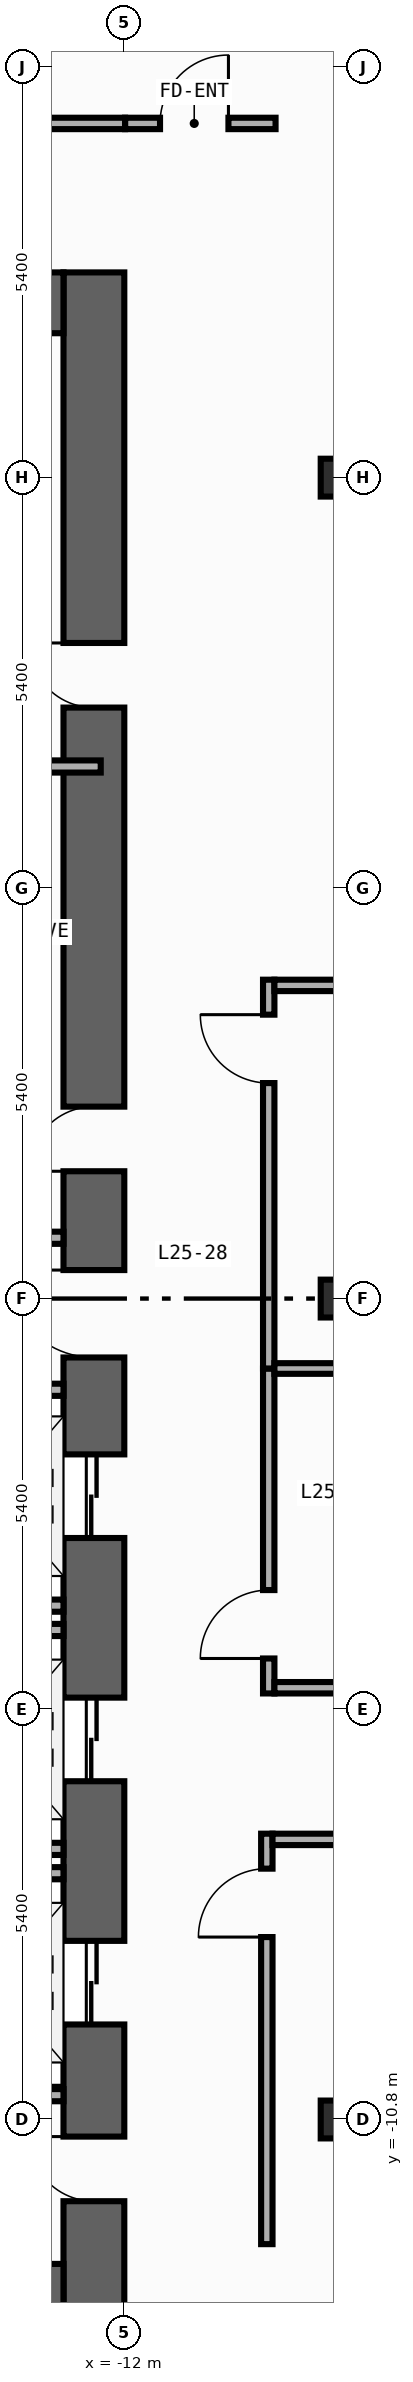
"""IFC4 building model, lengths in metres.
Left out: names, types, materials, properties, quantities, classifications, styles, units other than length and angle.
Written with IfcOpenShell. Run it as: python <this file> out.ifc"""

import sys

from ifc_helpers import new_model, si_unit, direction, frame, frame_2d, origin, origin_2d, place, context, subcontext, project, spatial, rectangle, i_section, extrude, element, fill, save


model = new_model("IFC4")
c1 = context("Model", 3, precision=1e-05, world=origin(), true_north=direction((0.0, 1.0)))
c2 = subcontext(c1, "Body", "Model", "MODEL_VIEW")
j1 = project(units=[si_unit("LENGTHUNIT", "METRE"), si_unit("PLANEANGLEUNIT", "RADIAN")], contexts=[c1])
p1 = place(None, origin())
s1 = spatial("IfcSite", under=j1, at=p1, CompositionType="ELEMENT")
p2 = place(p1, origin())
s2 = spatial("IfcBuilding", under=s1, at=p2, CompositionType="ELEMENT")
p3 = place(p2, frame((0.0, 0.0, 110.0)))
s3 = spatial("IfcBuildingStorey", under=s2, at=p3, CompositionType="ELEMENT", Elevation=110.0)
p4 = place(p3, frame((-12.4, -13.5, 0.0), z_axis=(0.0, 0.0, 1.0), x_axis=(0.0, 1.0, 0.0)))
e1 = element("IfcWall", 1, at=p4, inside=s3, PredefinedType="SHEAR", context=c2, shape_type="SweptSolid", body=[
    extrude(rectangle(XDim=27.0, YDim=0.8, at=frame_2d((13.5, 0.0))), origin(), (0.0, 0.0, 1.0), 3.94),
])
p5 = place(p4, frame((10.35, 0.0, 0.0)))
e2 = element("IfcOpeningElement", 2, at=p5, cuts=e1, PredefinedType="OPENING", context=c2, shape_type="SweptSolid", body=[
    extrude(rectangle(XDim=1.1, YDim=2.2, at=frame_2d((0.55, 1.1))), frame((0.0, 0.41, 0.0), z_axis=(0.0, -1.0, 0.0), x_axis=(1.0, 0.0, 0.0)), (0.0, 0.0, 1.0), 0.82),
])
p6 = place(p4, frame((7.15, 0.0, 0.0)))
e3 = element("IfcOpeningElement", 3, at=p6, cuts=e1, PredefinedType="OPENING", context=c2, shape_type="SweptSolid", body=[
    extrude(rectangle(XDim=1.1, YDim=2.2, at=frame_2d((0.55, 1.1))), frame((0.0, 0.41, 0.0), z_axis=(0.0, -1.0, 0.0), x_axis=(1.0, 0.0, 0.0)), (0.0, 0.0, 1.0), 0.82),
])
p7 = place(p4, frame((3.95, 0.0, 0.0)))
e4 = element("IfcOpeningElement", 4, at=p7, cuts=e1, PredefinedType="OPENING", context=c2, shape_type="SweptSolid", body=[
    extrude(rectangle(XDim=1.1, YDim=2.2, at=frame_2d((0.55, 1.1))), frame((0.0, 0.41, 0.0), z_axis=(0.0, -1.0, 0.0), x_axis=(1.0, 0.0, 0.0)), (0.0, 0.0, 1.0), 0.82),
])
p8 = place(p4, frame((15.175, 0.0, 0.0)))
e5 = element("IfcOpeningElement", 5, at=p8, cuts=e1, PredefinedType="OPENING", context=c2, shape_type="SweptSolid", body=[
    extrude(rectangle(XDim=0.85, YDim=2.1, at=frame_2d((0.425, 1.05))), frame((0.0, 0.41, 0.0), z_axis=(0.0, -1.0, 0.0), x_axis=(1.0, 0.0, 0.0)), (0.0, 0.0, 1.0), 0.82),
])
p9 = place(p4, frame((21.275, 0.0, 0.0)))
e6 = element("IfcOpeningElement", 6, at=p9, cuts=e1, PredefinedType="OPENING", context=c2, shape_type="SweptSolid", body=[
    extrude(rectangle(XDim=0.85, YDim=2.1, at=frame_2d((0.425, 1.05))), frame((0.0, 0.41, 0.0), z_axis=(0.0, -1.0, 0.0), x_axis=(1.0, 0.0, 0.0)), (0.0, 0.0, 1.0), 0.82),
])
p10 = place(p4, frame((12.725, 0.0, 0.0)))
e7 = element("IfcOpeningElement", 7, at=p10, cuts=e1, PredefinedType="OPENING", context=c2, shape_type="SweptSolid", body=[
    extrude(rectangle(XDim=1.15, YDim=2.2, at=frame_2d((0.575, 1.1))), frame((0.0, 0.41, 0.0), z_axis=(0.0, -1.0, 0.0), x_axis=(1.0, 0.0, 0.0)), (0.0, 0.0, 1.0), 0.82),
])
p11 = place(p4, frame((1.625, 0.0, 0.0)))
e8 = element("IfcOpeningElement", 8, at=p11, cuts=e1, PredefinedType="OPENING", context=c2, shape_type="SweptSolid", body=[
    extrude(rectangle(XDim=0.85, YDim=2.1, at=frame_2d((0.425, 1.05))), frame((0.0, 0.41, 0.0), z_axis=(0.0, -1.0, 0.0), x_axis=(1.0, 0.0, 0.0)), (0.0, 0.0, 1.0), 0.82),
])
for number, where, z_axis, x_axis in (
    (9, (-19.6, -13.1, 0.0), (0.0, 0.0, 1.0), (1.0, 0.0, 0.0)),
    (10, (-19.6, 13.1, 0.0), (0.0, 0.0, 1.0), (1.0, 0.0, 0.0)),
):
    element("IfcWall", number, at=place(p3, frame(where, z_axis=z_axis, x_axis=x_axis)), inside=s3, PredefinedType="SHEAR", context=c2, shape_type="SweptSolid", body=[
        extrude(rectangle(XDim=6.8, YDim=0.8, at=frame_2d((3.4, 0.0))), origin(), (0.0, 0.0, 1.0), 3.94),
    ])
for number, where, z_axis, x_axis in (
    (11, (-9.2, -10.8, 0.0), (0.0, 0.0, 1.0), (1.0, 0.0, 0.0)),
    (12, (-9.2, 0.0, 0.0), (0.0, 0.0, 1.0), (1.0, 0.0, 0.0)),
    (13, (-9.2, 10.8, 0.0), (0.0, 0.0, 1.0), (1.0, 0.0, 0.0)),
):
    element("IfcColumn", number, at=place(p3, frame(where, z_axis=z_axis, x_axis=x_axis)), inside=s3, PredefinedType="COLUMN", context=c2, shape_type="SweptSolid", body=[
        extrude(i_section(OverallWidth=0.432, OverallDepth=0.498, WebThickness=0.045, FlangeThickness=0.07, FilletRadius=0.022, at=origin_2d()), origin(), (0.0, 0.0, 1.0), 4.2),
    ])
for number, where, z_axis, x_axis in (
    (14, (-14.99, -4.04, 0.0), (0.0, 0.0, 1.0), (1.0, 0.0, 0.0)),
    (15, (-14.99, -7.24, 0.0), (0.0, 0.0, 1.0), (1.0, 0.0, 0.0)),
    (16, (-14.99, -4.36, 0.0), (0.0, 0.0, 1.0), (1.0, 0.0, 0.0)),
    (17, (-14.99, -7.56, 0.0), (0.0, 0.0, 1.0), (1.0, 0.0, 0.0)),
):
    element("IfcWall", number, at=place(p3, frame(where, z_axis=z_axis, x_axis=x_axis)), inside=s3, PredefinedType="STANDARD", context=c2, shape_type="SweptSolid", body=[
        extrude(rectangle(XDim=2.19, YDim=0.16, at=frame_2d((1.095, 0.0))), origin(), (0.0, 0.0, 1.0), 3.94),
    ])
for number, where, z_axis, x_axis in (
    (18, (-15.4, 0.8, 0.0), (0.0, 0.0, 1.0), (1.0, 0.0, 0.0)),
    (19, (-15.4, -1.2, 0.0), (0.0, 0.0, 1.0), (1.0, 0.0, 0.0)),
    (20, (-15.4, -10.48, 0.0), (0.0, 0.0, 1.0), (1.0, 0.0, 0.0)),
):
    element("IfcWall", number, at=place(p3, frame(where, z_axis=z_axis, x_axis=x_axis)), inside=s3, PredefinedType="STANDARD", context=c2, shape_type="SweptSolid", body=[
        extrude(rectangle(XDim=2.6, YDim=0.16, at=frame_2d((1.3, 0.0))), origin(), (0.0, 0.0, 1.0), 3.94),
    ])
p12 = place(p3, frame((-15.375, 7.0, 0.0), z_axis=(0.0, 0.0, 1.0), x_axis=(1.0, 0.0, 0.0)))
e21 = element("IfcWall", 21, at=p12, inside=s3, PredefinedType="PARTITIONING", context=c2, shape_type="SweptSolid", body=[
    extrude(rectangle(XDim=3.065, YDim=0.16, at=frame_2d((1.532, 0.0))), origin(), (0.0, 0.0, 1.0), 3.94),
])
p13 = place(p3, frame((-11.99, 15.46, 0.0), z_axis=(0.0, 0.0, 1.0), x_axis=(1.0, 0.0, 0.0)))
e22 = element("IfcWall", 22, at=p13, inside=s3, PredefinedType="PARTITIONING", context=c2, shape_type="SweptSolid", body=[
    extrude(rectangle(XDim=1.98, YDim=0.15, at=frame_2d((0.99, 0.0))), origin(), (0.0, 0.0, 1.0), 3.94),
])
p14 = place(p13, frame((0.46, 0.0, 0.0)))
e23 = element("IfcOpeningElement", 23, at=p14, cuts=e22, PredefinedType="OPENING", context=c2, shape_type="SweptSolid", body=[
    extrude(rectangle(XDim=0.9, YDim=2.15, at=frame_2d((0.45, 1.075))), frame((0.0, 0.085, 0.0), z_axis=(0.0, -1.0, 0.0), x_axis=(1.0, 0.0, 0.0)), (0.0, 0.0, 1.0), 0.17),
])
p15 = place(p3, frame((-10.1, -5.195, 0.0), z_axis=(0.0, 0.0, 1.0), x_axis=(0.0, 1.0, 0.0)))
e24 = element("IfcWall", 24, at=p15, inside=s3, PredefinedType="PARTITIONING", context=c2, shape_type="SweptSolid", body=[
    extrude(rectangle(XDim=4.275, YDim=0.15, at=frame_2d((2.138, 0.0))), origin(), (0.0, 0.0, 1.0), 3.94),
])
p16 = place(p15, frame((0.46, 0.0, 0.0)))
e25 = element("IfcOpeningElement", 25, at=p16, cuts=e24, PredefinedType="OPENING", context=c2, shape_type="SweptSolid", body=[
    extrude(rectangle(XDim=0.9, YDim=2.15, at=frame_2d((0.45, 1.075))), frame((0.0, 0.085, 0.0), z_axis=(0.0, -1.0, 0.0), x_axis=(1.0, 0.0, 0.0)), (0.0, 0.0, 1.0), 0.17),
])
p17 = place(p3, frame((-10.1, -0.92, 0.0), z_axis=(0.0, 0.0, 1.0), x_axis=(0.0, 1.0, 0.0)))
e26 = element("IfcWall", 26, at=p17, inside=s3, PredefinedType="PARTITIONING", context=c2, shape_type="SweptSolid", body=[
    extrude(rectangle(XDim=5.115, YDim=0.15, at=frame_2d((2.558, 0.0))), origin(), (0.0, 0.0, 1.0), 3.94),
])
p18 = place(p17, frame((3.755, 0.0, 0.0)))
e27 = element("IfcOpeningElement", 27, at=p18, cuts=e26, PredefinedType="OPENING", context=c2, shape_type="SweptSolid", body=[
    extrude(rectangle(XDim=0.9, YDim=2.15, at=frame_2d((0.45, 1.075))), frame((0.0, 0.085, 0.0), z_axis=(0.0, -1.0, 0.0), x_axis=(1.0, 0.0, 0.0)), (0.0, 0.0, 1.0), 0.17),
])
p19 = place(p3, frame((-10.125, -12.44, 0.0), z_axis=(0.0, 0.0, 1.0), x_axis=(0.0, 1.0, 0.0)))
e28 = element("IfcWall", 28, at=p19, inside=s3, PredefinedType="PARTITIONING", context=c2, shape_type="SweptSolid", body=[
    extrude(rectangle(XDim=5.4, YDim=0.15, at=frame_2d((2.7, 0.0))), origin(), (0.0, 0.0, 1.0), 3.94),
])
p20 = place(p19, frame((4.04, 0.0, 0.0)))
e29 = element("IfcOpeningElement", 29, at=p20, cuts=e28, PredefinedType="OPENING", context=c2, shape_type="SweptSolid", body=[
    extrude(rectangle(XDim=0.9, YDim=2.15, at=frame_2d((0.45, 1.075))), frame((0.0, 0.085, 0.0), z_axis=(0.0, -1.0, 0.0), x_axis=(1.0, 0.0, 0.0)), (0.0, 0.0, 1.0), 0.17),
])
p21 = place(p3, frame((-10.025, 4.12, 0.0), z_axis=(0.0, 0.0, 1.0), x_axis=(1.0, 0.0, 0.0)))
e30 = element("IfcWall", 30, at=p21, inside=s3, PredefinedType="PARTITIONING", context=c2, shape_type="SweptSolid", body=[
    extrude(rectangle(XDim=11.82, YDim=0.15, at=frame_2d((5.91, 0.0))), origin(), (0.0, 0.0, 1.0), 3.94),
])
p22 = place(p21, frame((9.644, 0.0, 0.0)))
e31 = element("IfcOpeningElement", 31, at=p22, cuts=e30, PredefinedType="OPENING", context=c2, shape_type="SweptSolid", body=[
    extrude(rectangle(XDim=0.9, YDim=2.15, at=frame_2d((0.45, 1.075))), frame((0.0, 0.085, 0.0), z_axis=(0.0, -1.0, 0.0), x_axis=(1.0, 0.0, 0.0)), (0.0, 0.0, 1.0), 0.17),
])
p23 = place(p3, frame((-10.025, -5.12, 0.0), z_axis=(0.0, 0.0, 1.0), x_axis=(1.0, 0.0, 0.0)))
e32 = element("IfcWall", 32, at=p23, inside=s3, PredefinedType="PARTITIONING", context=c2, shape_type="SweptSolid", body=[
    extrude(rectangle(XDim=4.465, YDim=0.15, at=frame_2d((2.232, 0.0))), origin(), (0.0, 0.0, 1.0), 3.94),
])
p24 = place(p23, frame((3.105, 0.0, 0.0)))
e33 = element("IfcOpeningElement", 33, at=p24, cuts=e32, PredefinedType="OPENING", context=c2, shape_type="SweptSolid", body=[
    extrude(rectangle(XDim=0.9, YDim=2.15, at=frame_2d((0.45, 1.075))), frame((0.0, 0.085, 0.0), z_axis=(0.0, -1.0, 0.0), x_axis=(1.0, 0.0, 0.0)), (0.0, 0.0, 1.0), 0.17),
])
p25 = place(p3, frame((-10.05, -7.115, 0.0), z_axis=(0.0, 0.0, 1.0), x_axis=(1.0, 0.0, 0.0)))
e34 = element("IfcWall", 34, at=p25, inside=s3, PredefinedType="PARTITIONING", context=c2, shape_type="SweptSolid", body=[
    extrude(rectangle(XDim=8.265, YDim=0.15, at=frame_2d((4.133, 0.0))), origin(), (0.0, 0.0, 1.0), 3.94),
])
p26 = place(p25, frame((6.905, 0.0, 0.0)))
e35 = element("IfcOpeningElement", 35, at=p26, cuts=e34, PredefinedType="OPENING", context=c2, shape_type="SweptSolid", body=[
    extrude(rectangle(XDim=0.9, YDim=2.15, at=frame_2d((0.45, 1.075))), frame((0.0, 0.085, 0.0), z_axis=(0.0, -1.0, 0.0), x_axis=(1.0, 0.0, 0.0)), (0.0, 0.0, 1.0), 0.17),
])
p27 = place(p3, frame((-20.64, 15.46, 0.0), z_axis=(0.0, 0.0, 1.0), x_axis=(1.0, 0.0, 0.0)))
e36 = element("IfcWall", 36, at=p27, inside=s3, PredefinedType="PARTITIONING", context=c2, shape_type="SweptSolid", body=[
    extrude(rectangle(XDim=8.65, YDim=0.15, at=frame_2d((4.325, 0.0))), origin(), (0.0, 0.0, 1.0), 3.94),
])
p28 = place(p27, frame((2.871, 0.0, 0.0)))
e37 = element("IfcOpeningElement", 37, at=p28, cuts=e36, PredefinedType="OPENING", context=c2, shape_type="SweptSolid", body=[
    extrude(rectangle(XDim=0.9, YDim=2.15, at=frame_2d((0.45, 1.075))), frame((0.0, 0.085, 0.0), z_axis=(0.0, -1.0, 0.0), x_axis=(1.0, 0.0, 0.0)), (0.0, 0.0, 1.0), 0.17),
])
p29 = place(p3, frame((-10.025, -0.92, 0.0), z_axis=(0.0, 0.0, 1.0), x_axis=(1.0, 0.0, 0.0)))
e38 = element("IfcWall", 38, at=p29, inside=s3, PredefinedType="PARTITIONING", context=c2, shape_type="SweptSolid", body=[
    extrude(rectangle(XDim=4.465, YDim=0.14, at=frame_2d((2.232, 0.0))), origin(), (0.0, 0.0, 1.0), 3.94),
])
p30 = place(p5, origin())
e39 = element("IfcDoor", 39, at=p30, inside=s3, OperationType="DOUBLE_DOOR_SLIDING", PredefinedType="DOOR", context=c2, shape_type="SweptSolid", body=[
    extrude(rectangle(XDim=1.1, YDim=2.2, at=frame_2d((0.55, 1.1))), frame((0.0, 0.025, 0.0), z_axis=(0.0, -1.0, 0.0), x_axis=(1.0, 0.0, 0.0)), (0.0, 0.0, 1.0), 0.05),
])
fill(e2, e39)
p31 = place(p6, origin())
e40 = element("IfcDoor", 40, at=p31, inside=s3, OperationType="DOUBLE_DOOR_SLIDING", PredefinedType="DOOR", context=c2, shape_type="SweptSolid", body=[
    extrude(rectangle(XDim=1.1, YDim=2.2, at=frame_2d((0.55, 1.1))), frame((0.0, 0.025, 0.0), z_axis=(0.0, -1.0, 0.0), x_axis=(1.0, 0.0, 0.0)), (0.0, 0.0, 1.0), 0.05),
])
fill(e3, e40)
p32 = place(p7, origin())
e41 = element("IfcDoor", 41, at=p32, inside=s3, OperationType="DOUBLE_DOOR_SLIDING", PredefinedType="DOOR", context=c2, shape_type="SweptSolid", body=[
    extrude(rectangle(XDim=1.1, YDim=2.2, at=frame_2d((0.55, 1.1))), frame((0.0, 0.025, 0.0), z_axis=(0.0, -1.0, 0.0), x_axis=(1.0, 0.0, 0.0)), (0.0, 0.0, 1.0), 0.05),
])
fill(e4, e41)
p33 = place(p8, origin())
e42 = element("IfcDoor", 42, at=p33, inside=s3, OperationType="SINGLE_SWING_LEFT", PredefinedType="DOOR", context=c2, shape_type="SweptSolid", body=[
    extrude(rectangle(XDim=0.85, YDim=2.1, at=frame_2d((0.425, 1.05))), frame((0.0, 0.025, 0.0), z_axis=(0.0, -1.0, 0.0), x_axis=(1.0, 0.0, 0.0)), (0.0, 0.0, 1.0), 0.05),
])
fill(e5, e42)
p34 = place(p9, origin())
e43 = element("IfcDoor", 43, at=p34, inside=s3, OperationType="SINGLE_SWING_RIGHT", PredefinedType="DOOR", context=c2, shape_type="SweptSolid", body=[
    extrude(rectangle(XDim=0.85, YDim=2.1, at=frame_2d((0.425, 1.05))), frame((0.0, 0.025, 0.0), z_axis=(0.0, -1.0, 0.0), x_axis=(1.0, 0.0, 0.0)), (0.0, 0.0, 1.0), 0.05),
])
fill(e6, e43)
p35 = place(p10, origin())
e44 = element("IfcDoor", 44, at=p35, inside=s3, OperationType="SINGLE_SWING_RIGHT", PredefinedType="DOOR", context=c2, shape_type="SweptSolid", body=[
    extrude(rectangle(XDim=1.15, YDim=2.2, at=frame_2d((0.575, 1.1))), frame((0.0, 0.025, 0.0), z_axis=(0.0, -1.0, 0.0), x_axis=(1.0, 0.0, 0.0)), (0.0, 0.0, 1.0), 0.05),
])
fill(e7, e44)
p36 = place(p11, origin())
e45 = element("IfcDoor", 45, at=p36, inside=s3, OperationType="SINGLE_SWING_RIGHT", PredefinedType="DOOR", context=c2, shape_type="SweptSolid", body=[
    extrude(rectangle(XDim=0.85, YDim=2.1, at=frame_2d((0.425, 1.05))), frame((0.0, 0.025, 0.0), z_axis=(0.0, -1.0, 0.0), x_axis=(1.0, 0.0, 0.0)), (0.0, 0.0, 1.0), 0.05),
])
fill(e8, e45)
p37 = place(p14, origin())
e46 = element("IfcDoor", 46, at=p37, inside=s3, OperationType="SINGLE_SWING_RIGHT", PredefinedType="DOOR", context=c2, shape_type="SweptSolid", body=[
    extrude(rectangle(XDim=0.9, YDim=2.15, at=frame_2d((0.45, 1.075))), frame((0.0, 0.025, 0.0), z_axis=(0.0, -1.0, 0.0), x_axis=(1.0, 0.0, 0.0)), (0.0, 0.0, 1.0), 0.05),
])
fill(e23, e46)
p38 = place(p16, origin())
e47 = element("IfcDoor", 47, at=p38, inside=s3, OperationType="SINGLE_SWING_LEFT", PredefinedType="DOOR", context=c2, shape_type="SweptSolid", body=[
    extrude(rectangle(XDim=0.9, YDim=2.15, at=frame_2d((0.45, 1.075))), frame((0.0, 0.025, 0.0), z_axis=(0.0, -1.0, 0.0), x_axis=(1.0, 0.0, 0.0)), (0.0, 0.0, 1.0), 0.05),
])
fill(e25, e47)
p39 = place(p18, origin())
e48 = element("IfcDoor", 48, at=p39, inside=s3, OperationType="SINGLE_SWING_RIGHT", PredefinedType="DOOR", context=c2, shape_type="SweptSolid", body=[
    extrude(rectangle(XDim=0.9, YDim=2.15, at=frame_2d((0.45, 1.075))), frame((0.0, 0.025, 0.0), z_axis=(0.0, -1.0, 0.0), x_axis=(1.0, 0.0, 0.0)), (0.0, 0.0, 1.0), 0.05),
])
fill(e27, e48)
p40 = place(p20, origin())
e49 = element("IfcDoor", 49, at=p40, inside=s3, OperationType="SINGLE_SWING_LEFT", PredefinedType="DOOR", context=c2, shape_type="SweptSolid", body=[
    extrude(rectangle(XDim=0.9, YDim=2.15, at=frame_2d((0.45, 1.075))), frame((0.0, 0.025, 0.0), z_axis=(0.0, -1.0, 0.0), x_axis=(1.0, 0.0, 0.0)), (0.0, 0.0, 1.0), 0.05),
])
fill(e29, e49)
save(model, sys.argv[1])
